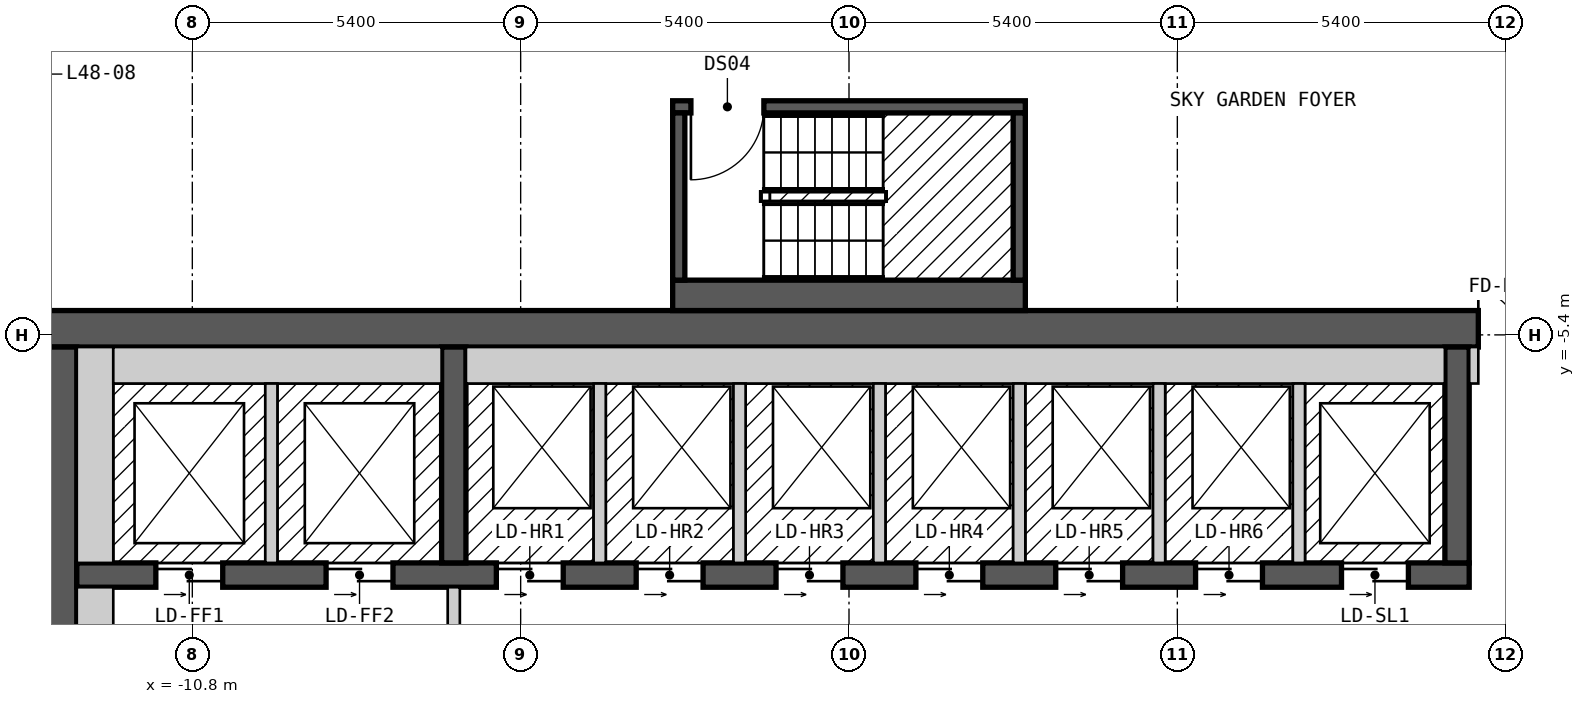
"""IFC4 building model, lengths in metres.
Left out: names, types, materials, properties, quantities, classifications, styles, units other than length and angle.
Written with IfcOpenShell. Run it as: python <this file> out.ifc"""

import sys

from ifc_helpers import new_model, si_unit, direction, frame, frame_2d, origin, place, context, subcontext, project, spatial, rectangle, extrude, element, fill, save


model = new_model("IFC4")
c1 = context("Model", 3, precision=1e-05, world=origin(), true_north=direction((0.0, 1.0)))
c2 = subcontext(c1, "Body", "Model", "MODEL_VIEW")
j1 = project(units=[si_unit("LENGTHUNIT", "METRE"), si_unit("PLANEANGLEUNIT", "RADIAN")], contexts=[c1])
p1 = place(None, origin())
s1 = spatial("IfcSite", under=j1, at=p1, CompositionType="ELEMENT")
p2 = place(p1, origin())
s2 = spatial("IfcBuilding", under=s1, at=p2, CompositionType="ELEMENT")
p3 = place(p2, frame((0.0, 0.0, 157.2)))
s3 = spatial("IfcBuildingStorey", under=s2, at=p3, CompositionType="ELEMENT", Elevation=157.2)
p4 = place(p3, frame((-13.3, -5.3, 0.0), z_axis=(0.0, 0.0, 1.0), x_axis=(1.0, 0.0, 0.0)))
e1 = element("IfcWall", 1, at=p4, inside=s3, PredefinedType="SHEAR", context=c2, shape_type="SweptSolid", body=[
    extrude(rectangle(XDim=26.6, YDim=0.6, at=frame_2d((13.3, 0.0))), origin(), (0.0, 0.0, 1.0), 5.7),
])
p5 = place(p4, frame((23.65, 0.0, 0.0)))
e2 = element("IfcOpeningElement", 2, at=p5, cuts=e1, PredefinedType="OPENING", context=c2, shape_type="SweptSolid", body=[
    extrude(rectangle(XDim=1.2, YDim=2.1, at=frame_2d((0.6, 1.05))), frame((0.0, 0.31, 0.0), z_axis=(0.0, -1.0, 0.0), x_axis=(1.0, 0.0, 0.0)), (0.0, 0.0, 1.0), 0.62),
])
p6 = place(p3, frame((-13.0, -18.4, 0.0), z_axis=(0.0, 0.0, 1.0), x_axis=(0.0, 1.0, 0.0)))
e3 = element("IfcWall", 3, at=p6, inside=s3, PredefinedType="SHEAR", context=c2, shape_type="SweptSolid", body=[
    extrude(rectangle(XDim=12.8, YDim=0.6, at=frame_2d((6.4, 0.0))), origin(), (0.0, 0.0, 1.0), 5.7),
])
p7 = place(p6, frame((4.2, 0.0, 0.0)))
e4 = element("IfcOpeningElement", 4, at=p7, cuts=e3, PredefinedType="OPENING", context=c2, shape_type="SweptSolid", body=[
    extrude(rectangle(XDim=1.2, YDim=2.1, at=frame_2d((0.6, 1.05))), frame((0.0, 0.31, 0.0), z_axis=(0.0, -1.0, 0.0), x_axis=(1.0, 0.0, 0.0)), (0.0, 0.0, 1.0), 0.62),
])
p8 = place(p3, frame((-12.7, -9.35, 0.0), z_axis=(0.0, 0.0, 1.0), x_axis=(1.0, 0.0, 0.0)))
e5 = element("IfcWall", 5, at=p8, inside=s3, PredefinedType="SHEAR", context=c2, shape_type="SweptSolid", body=[
    extrude(rectangle(XDim=22.9, YDim=0.4, at=frame_2d((11.45, 0.0))), origin(), (0.0, 0.0, 1.0), 5.7),
])
p9 = place(p8, frame((1.3, 0.0, 0.0)))
e6 = element("IfcOpeningElement", 6, at=p9, cuts=e5, PredefinedType="OPENING", context=c2, shape_type="SweptSolid", body=[
    extrude(rectangle(XDim=1.1, YDim=2.1, at=frame_2d((0.55, 1.05))), frame((0.0, 0.21, 0.0), z_axis=(0.0, -1.0, 0.0), x_axis=(1.0, 0.0, 0.0)), (0.0, 0.0, 1.0), 0.42),
])
p10 = place(p8, frame((4.1, 0.0, 0.0)))
e7 = element("IfcOpeningElement", 7, at=p10, cuts=e5, PredefinedType="OPENING", context=c2, shape_type="SweptSolid", body=[
    extrude(rectangle(XDim=1.1, YDim=2.1, at=frame_2d((0.55, 1.05))), frame((0.0, 0.21, 0.0), z_axis=(0.0, -1.0, 0.0), x_axis=(1.0, 0.0, 0.0)), (0.0, 0.0, 1.0), 0.42),
])
p11 = place(p8, frame((6.9, 0.0, 0.0)))
e8 = element("IfcOpeningElement", 8, at=p11, cuts=e5, PredefinedType="OPENING", context=c2, shape_type="SweptSolid", body=[
    extrude(rectangle(XDim=1.1, YDim=2.1, at=frame_2d((0.55, 1.05))), frame((0.0, 0.21, 0.0), z_axis=(0.0, -1.0, 0.0), x_axis=(1.0, 0.0, 0.0)), (0.0, 0.0, 1.0), 0.42),
])
p12 = place(p8, frame((9.2, 0.0, 0.0)))
e9 = element("IfcOpeningElement", 9, at=p12, cuts=e5, PredefinedType="OPENING", context=c2, shape_type="SweptSolid", body=[
    extrude(rectangle(XDim=1.1, YDim=2.1, at=frame_2d((0.55, 1.05))), frame((0.0, 0.21, 0.0), z_axis=(0.0, -1.0, 0.0), x_axis=(1.0, 0.0, 0.0)), (0.0, 0.0, 1.0), 0.42),
])
p13 = place(p8, frame((11.5, 0.0, 0.0)))
e10 = element("IfcOpeningElement", 10, at=p13, cuts=e5, PredefinedType="OPENING", context=c2, shape_type="SweptSolid", body=[
    extrude(rectangle(XDim=1.1, YDim=2.1, at=frame_2d((0.55, 1.05))), frame((0.0, 0.21, 0.0), z_axis=(0.0, -1.0, 0.0), x_axis=(1.0, 0.0, 0.0)), (0.0, 0.0, 1.0), 0.42),
])
p14 = place(p8, frame((13.8, 0.0, 0.0)))
e11 = element("IfcOpeningElement", 11, at=p14, cuts=e5, PredefinedType="OPENING", context=c2, shape_type="SweptSolid", body=[
    extrude(rectangle(XDim=1.1, YDim=2.1, at=frame_2d((0.55, 1.05))), frame((0.0, 0.21, 0.0), z_axis=(0.0, -1.0, 0.0), x_axis=(1.0, 0.0, 0.0)), (0.0, 0.0, 1.0), 0.42),
])
p15 = place(p8, frame((16.1, 0.0, 0.0)))
e12 = element("IfcOpeningElement", 12, at=p15, cuts=e5, PredefinedType="OPENING", context=c2, shape_type="SweptSolid", body=[
    extrude(rectangle(XDim=1.1, YDim=2.1, at=frame_2d((0.55, 1.05))), frame((0.0, 0.21, 0.0), z_axis=(0.0, -1.0, 0.0), x_axis=(1.0, 0.0, 0.0)), (0.0, 0.0, 1.0), 0.42),
])
p16 = place(p8, frame((18.4, 0.0, 0.0)))
e13 = element("IfcOpeningElement", 13, at=p16, cuts=e5, PredefinedType="OPENING", context=c2, shape_type="SweptSolid", body=[
    extrude(rectangle(XDim=1.1, YDim=2.1, at=frame_2d((0.55, 1.05))), frame((0.0, 0.21, 0.0), z_axis=(0.0, -1.0, 0.0), x_axis=(1.0, 0.0, 0.0)), (0.0, 0.0, 1.0), 0.42),
])
p17 = place(p8, frame((20.8, 0.0, 0.0)))
e14 = element("IfcOpeningElement", 14, at=p17, cuts=e5, PredefinedType="OPENING", context=c2, shape_type="SweptSolid", body=[
    extrude(rectangle(XDim=1.1, YDim=2.1, at=frame_2d((0.55, 1.05))), frame((0.0, 0.21, 0.0), z_axis=(0.0, -1.0, 0.0), x_axis=(1.0, 0.0, 0.0)), (0.0, 0.0, 1.0), 0.42),
])
for number, where, z_axis, x_axis in (
    (15, (-6.5, -9.15, 0.0), (0.0, 0.0, 1.0), (0.0, 1.0, 0.0)),
    (16, (10.0, -9.15, 0.0), (0.0, 0.0, 1.0), (0.0, 1.0, 0.0)),
):
    element("IfcWall", number, at=place(p3, frame(where, z_axis=z_axis, x_axis=x_axis)), inside=s3, PredefinedType="SHEAR", context=c2, shape_type="SweptSolid", body=[
        extrude(rectangle(XDim=3.55, YDim=0.4, at=frame_2d((1.775, 0.0))), origin(), (0.0, 0.0, 1.0), 5.7),
    ])
p18 = place(p3, frame((-2.9, -4.75, 0.0), z_axis=(0.0, 0.0, 1.0), x_axis=(1.0, 0.0, 0.0)))
e17 = element("IfcWall", 17, at=p18, inside=s3, PredefinedType="SOLIDWALL", context=c2, shape_type="SweptSolid", body=[
    extrude(rectangle(XDim=5.8, YDim=0.5, at=frame_2d((2.9, 0.0))), origin(), (0.0, 0.0, 1.0), 5.7),
])
p19 = place(p3, frame((-2.9, -1.65, 0.0), z_axis=(0.0, 0.0, 1.0), x_axis=(1.0, 0.0, 0.0)))
e18 = element("IfcWall", 18, at=p19, inside=s3, PredefinedType="SOLIDWALL", context=c2, shape_type="SweptSolid", body=[
    extrude(rectangle(XDim=5.8, YDim=0.2, at=frame_2d((2.9, 0.0))), origin(), (0.0, 0.0, 1.0), 5.7),
])
p20 = place(p19, frame((0.3, 0.0, 0.0)))
e19 = element("IfcOpeningElement", 19, at=p20, cuts=e18, PredefinedType="OPENING", context=c2, shape_type="SweptSolid", body=[
    extrude(rectangle(XDim=1.2, YDim=2.1, at=frame_2d((0.6, 1.05))), frame((0.0, 0.11, 0.0), z_axis=(0.0, -1.0, 0.0), x_axis=(1.0, 0.0, 0.0)), (0.0, 0.0, 1.0), 0.22),
])
for number, where, z_axis, x_axis in (
    (20, (-2.8, -4.5, 0.0), (0.0, 0.0, 1.0), (0.0, 1.0, 0.0)),
    (21, (2.8, -4.5, 0.0), (0.0, 0.0, 1.0), (0.0, 1.0, 0.0)),
):
    element("IfcWall", number, at=place(p3, frame(where, z_axis=z_axis, x_axis=x_axis)), inside=s3, PredefinedType="SOLIDWALL", context=c2, shape_type="SweptSolid", body=[
        extrude(rectangle(XDim=2.75, YDim=0.2, at=frame_2d((1.375, 0.0))), origin(), (0.0, 0.0, 1.0), 5.7),
    ])
p21 = place(p3, frame((-12.4, -13.0, 0.0), z_axis=(0.0, 0.0, 1.0), x_axis=(0.0, 1.0, 0.0)))
e22 = element("IfcWall", 22, at=p21, inside=s3, PredefinedType="PARTITIONING", context=c2, shape_type="SweptSolid", body=[
    extrude(rectangle(XDim=3.45, YDim=0.6, at=frame_2d((1.725, 0.0))), origin(), (0.0, 0.0, 1.0), 5.7),
])
p22 = place(p3, frame((-12.4, -9.15, 0.0), z_axis=(0.0, 0.0, 1.0), x_axis=(0.0, 1.0, 0.0)))
e23 = element("IfcWall", 23, at=p22, inside=s3, PredefinedType="SOLIDWALL", context=c2, shape_type="SweptSolid", body=[
    extrude(rectangle(XDim=3.55, YDim=0.6, at=frame_2d((1.775, 0.0))), origin(), (0.0, 0.0, 1.0), 5.7),
])
p23 = place(p3, frame((-12.1, -5.9, 0.0), z_axis=(0.0, 0.0, 1.0), x_axis=(1.0, 0.0, 0.0)))
e24 = element("IfcWall", 24, at=p23, inside=s3, PredefinedType="SOLIDWALL", context=c2, shape_type="SweptSolid", body=[
    extrude(rectangle(XDim=5.4, YDim=0.6, at=frame_2d((2.7, 0.0))), origin(), (0.0, 0.0, 1.0), 5.7),
])
p24 = place(p3, frame((-9.5, -9.15, 0.0), z_axis=(0.0, 0.0, 1.0), x_axis=(0.0, 1.0, 0.0)))
e25 = element("IfcWall", 25, at=p24, inside=s3, PredefinedType="SOLIDWALL", context=c2, shape_type="SweptSolid", body=[
    extrude(rectangle(XDim=2.95, YDim=0.2, at=frame_2d((1.475, 0.0))), origin(), (0.0, 0.0, 1.0), 5.7),
])
p25 = place(p3, frame((-6.5, -14.45, 0.0), z_axis=(0.0, 0.0, 1.0), x_axis=(0.0, 1.0, 0.0)))
e26 = element("IfcWall", 26, at=p25, inside=s3, PredefinedType="PARTITIONING", context=c2, shape_type="SweptSolid", body=[
    extrude(rectangle(XDim=4.9, YDim=0.2, at=frame_2d((2.45, 0.0))), origin(), (0.0, 0.0, 1.0), 5.7),
])
p26 = place(p25, frame((3.15, 0.0, 0.0), z_axis=(0.0, 0.0, 1.0), x_axis=(-1.0, 0.0, 0.0)))
e27 = element("IfcOpeningElement", 27, at=p26, cuts=e26, PredefinedType="OPENING", context=c2, shape_type="SweptSolid", body=[
    extrude(rectangle(XDim=1.4, YDim=2.1, at=frame_2d((0.7, 1.05))), frame((0.0, 0.11, 0.0), z_axis=(0.0, -1.0, 0.0), x_axis=(1.0, 0.0, 0.0)), (0.0, 0.0, 1.0), 0.22),
])
p27 = place(p3, frame((-6.3, -5.9, 0.0), z_axis=(0.0, 0.0, 1.0), x_axis=(1.0, 0.0, 0.0)))
e28 = element("IfcWall", 28, at=p27, inside=s3, PredefinedType="SOLIDWALL", context=c2, shape_type="SweptSolid", body=[
    extrude(rectangle(XDim=16.1, YDim=0.6, at=frame_2d((8.05, 0.0))), origin(), (0.0, 0.0, 1.0), 5.7),
])
for number, where, z_axis, x_axis in (
    (29, (-4.1, -9.15, 0.0), (0.0, 0.0, 1.0), (0.0, 1.0, 0.0)),
    (30, (-1.8, -9.15, 0.0), (0.0, 0.0, 1.0), (0.0, 1.0, 0.0)),
    (31, (0.5, -9.15, 0.0), (0.0, 0.0, 1.0), (0.0, 1.0, 0.0)),
    (32, (2.8, -9.15, 0.0), (0.0, 0.0, 1.0), (0.0, 1.0, 0.0)),
    (33, (5.1, -9.15, 0.0), (0.0, 0.0, 1.0), (0.0, 1.0, 0.0)),
    (34, (7.4, -9.15, 0.0), (0.0, 0.0, 1.0), (0.0, 1.0, 0.0)),
):
    element("IfcWall", number, at=place(p3, frame(where, z_axis=z_axis, x_axis=x_axis)), inside=s3, PredefinedType="SOLIDWALL", context=c2, shape_type="SweptSolid", body=[
        extrude(rectangle(XDim=2.95, YDim=0.2, at=frame_2d((1.475, 0.0))), origin(), (0.0, 0.0, 1.0), 5.7),
    ])
p28 = place(p3, frame((10.275, -6.2, 0.0), z_axis=(0.0, 0.0, 1.0), x_axis=(0.0, 1.0, 0.0)))
e35 = element("IfcWall", 35, at=p28, inside=s3, PredefinedType="PARTITIONING", context=c2, shape_type="SweptSolid", body=[
    extrude(rectangle(XDim=0.6, YDim=0.15, at=frame_2d((0.3, 0.0))), origin(), (0.0, 0.0, 1.0), 5.7),
])
p29 = place(p20, origin())
e36 = element("IfcDoor", 36, at=p29, inside=s3, OperationType="SINGLE_SWING_LEFT", PredefinedType="DOOR", context=c2, shape_type="SweptSolid", body=[
    extrude(rectangle(XDim=1.2, YDim=2.1, at=frame_2d((0.6, 1.05))), frame((0.0, 0.025, 0.0), z_axis=(0.0, -1.0, 0.0), x_axis=(1.0, 0.0, 0.0)), (0.0, 0.0, 1.0), 0.05),
])
fill(e19, e36)
p30 = place(p9, origin())
e37 = element("IfcDoor", 37, at=p30, inside=s3, OperationType="DOUBLE_DOOR_SLIDING", PredefinedType="DOOR", context=c2, shape_type="SweptSolid", body=[
    extrude(rectangle(XDim=1.1, YDim=2.1, at=frame_2d((0.55, 1.05))), frame((0.0, 0.025, 0.0), z_axis=(0.0, -1.0, 0.0), x_axis=(1.0, 0.0, 0.0)), (0.0, 0.0, 1.0), 0.05),
])
fill(e6, e37)
p31 = place(p10, origin())
e38 = element("IfcDoor", 38, at=p31, inside=s3, OperationType="DOUBLE_DOOR_SLIDING", PredefinedType="DOOR", context=c2, shape_type="SweptSolid", body=[
    extrude(rectangle(XDim=1.1, YDim=2.1, at=frame_2d((0.55, 1.05))), frame((0.0, 0.025, 0.0), z_axis=(0.0, -1.0, 0.0), x_axis=(1.0, 0.0, 0.0)), (0.0, 0.0, 1.0), 0.05),
])
fill(e7, e38)
p32 = place(p11, origin())
e39 = element("IfcDoor", 39, at=p32, inside=s3, OperationType="DOUBLE_DOOR_SLIDING", PredefinedType="DOOR", context=c2, shape_type="SweptSolid", body=[
    extrude(rectangle(XDim=1.1, YDim=2.1, at=frame_2d((0.55, 1.05))), frame((0.0, 0.025, 0.0), z_axis=(0.0, -1.0, 0.0), x_axis=(1.0, 0.0, 0.0)), (0.0, 0.0, 1.0), 0.05),
])
fill(e8, e39)
p33 = place(p12, origin())
e40 = element("IfcDoor", 40, at=p33, inside=s3, OperationType="DOUBLE_DOOR_SLIDING", PredefinedType="DOOR", context=c2, shape_type="SweptSolid", body=[
    extrude(rectangle(XDim=1.1, YDim=2.1, at=frame_2d((0.55, 1.05))), frame((0.0, 0.025, 0.0), z_axis=(0.0, -1.0, 0.0), x_axis=(1.0, 0.0, 0.0)), (0.0, 0.0, 1.0), 0.05),
])
fill(e9, e40)
p34 = place(p13, origin())
e41 = element("IfcDoor", 41, at=p34, inside=s3, OperationType="DOUBLE_DOOR_SLIDING", PredefinedType="DOOR", context=c2, shape_type="SweptSolid", body=[
    extrude(rectangle(XDim=1.1, YDim=2.1, at=frame_2d((0.55, 1.05))), frame((0.0, 0.025, 0.0), z_axis=(0.0, -1.0, 0.0), x_axis=(1.0, 0.0, 0.0)), (0.0, 0.0, 1.0), 0.05),
])
fill(e10, e41)
p35 = place(p14, origin())
e42 = element("IfcDoor", 42, at=p35, inside=s3, OperationType="DOUBLE_DOOR_SLIDING", PredefinedType="DOOR", context=c2, shape_type="SweptSolid", body=[
    extrude(rectangle(XDim=1.1, YDim=2.1, at=frame_2d((0.55, 1.05))), frame((0.0, 0.025, 0.0), z_axis=(0.0, -1.0, 0.0), x_axis=(1.0, 0.0, 0.0)), (0.0, 0.0, 1.0), 0.05),
])
fill(e11, e42)
p36 = place(p15, origin())
e43 = element("IfcDoor", 43, at=p36, inside=s3, OperationType="DOUBLE_DOOR_SLIDING", PredefinedType="DOOR", context=c2, shape_type="SweptSolid", body=[
    extrude(rectangle(XDim=1.1, YDim=2.1, at=frame_2d((0.55, 1.05))), frame((0.0, 0.025, 0.0), z_axis=(0.0, -1.0, 0.0), x_axis=(1.0, 0.0, 0.0)), (0.0, 0.0, 1.0), 0.05),
])
fill(e12, e43)
p37 = place(p16, origin())
e44 = element("IfcDoor", 44, at=p37, inside=s3, OperationType="DOUBLE_DOOR_SLIDING", PredefinedType="DOOR", context=c2, shape_type="SweptSolid", body=[
    extrude(rectangle(XDim=1.1, YDim=2.1, at=frame_2d((0.55, 1.05))), frame((0.0, 0.025, 0.0), z_axis=(0.0, -1.0, 0.0), x_axis=(1.0, 0.0, 0.0)), (0.0, 0.0, 1.0), 0.05),
])
fill(e13, e44)
p38 = place(p17, origin())
e45 = element("IfcDoor", 45, at=p38, inside=s3, OperationType="DOUBLE_DOOR_SLIDING", PredefinedType="DOOR", context=c2, shape_type="SweptSolid", body=[
    extrude(rectangle(XDim=1.1, YDim=2.1, at=frame_2d((0.55, 1.05))), frame((0.0, 0.025, 0.0), z_axis=(0.0, -1.0, 0.0), x_axis=(1.0, 0.0, 0.0)), (0.0, 0.0, 1.0), 0.05),
])
fill(e14, e45)
p39 = place(p5, origin())
e46 = element("IfcDoor", 46, at=p39, inside=s3, OperationType="DOUBLE_DOOR_SINGLE_SWING", PredefinedType="DOOR", context=c2, shape_type="SweptSolid", body=[
    extrude(rectangle(XDim=1.2, YDim=2.1, at=frame_2d((0.6, 1.05))), frame((0.0, 0.025, 0.0), z_axis=(0.0, -1.0, 0.0), x_axis=(1.0, 0.0, 0.0)), (0.0, 0.0, 1.0), 0.05),
])
fill(e2, e46)
save(model, sys.argv[1])
